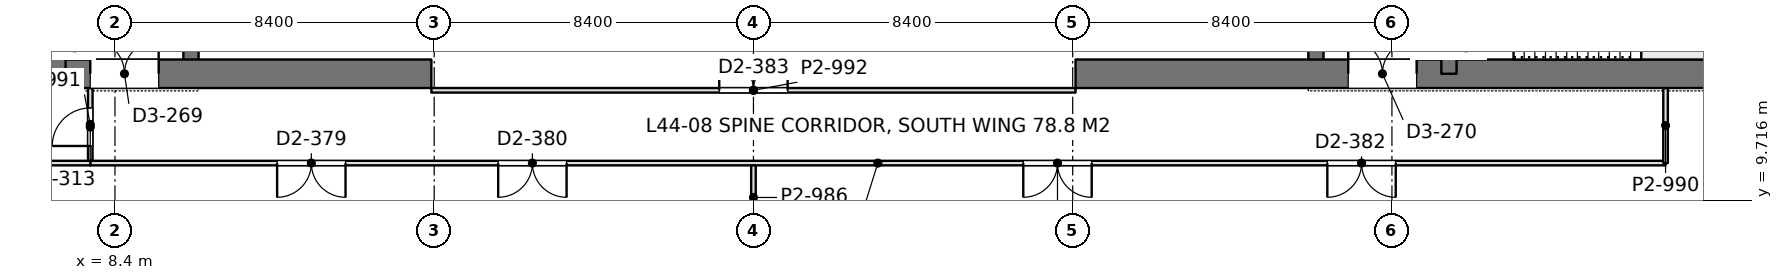
"""IFC4 building model, lengths in metres.
Left out: names, types, materials, properties, quantities, classifications, styles, units other than length and angle.
Written with IfcOpenShell. Run it as: python <this file> out.ifc"""

import sys

from ifc_helpers import new_model, si_unit, direction, frame, frame_2d, origin, place, context, subcontext, project, spatial, rectangle, extrude, element, fill, save


model = new_model("IFC4")
c1 = context("Model", 3, precision=1e-05, world=origin(), true_north=direction((0.0, 1.0)))
c2 = subcontext(c1, "Body", "Model", "MODEL_VIEW")
j1 = project(units=[si_unit("LENGTHUNIT", "METRE"), si_unit("PLANEANGLEUNIT", "RADIAN")], contexts=[c1])
p1 = place(None, origin())
s1 = spatial("IfcSite", under=j1, at=p1, CompositionType="ELEMENT")
p2 = place(p1, origin())
s2 = spatial("IfcBuilding", under=s1, at=p2, CompositionType="ELEMENT")
p3 = place(p2, frame((0.0, 0.0, 194.4)))
s3 = spatial("IfcBuildingStorey", under=s2, at=p3, CompositionType="ELEMENT", Elevation=194.4)
p4 = place(p3, frame((-1.125, 13.05, 0.0), z_axis=(0.0, 0.0, 1.0), x_axis=(1.0, 0.0, 0.0)))
e1 = element("IfcWall", 1, at=p4, inside=s3, PredefinedType="SHEAR", context=c2, shape_type="SweptSolid", body=[
    extrude(rectangle(XDim=17.85, YDim=0.75, at=frame_2d((8.925, 0.0))), origin(), (0.0, 0.0, 1.0), 4.2),
])
p5 = place(p4, frame((8.875, 0.0, 0.0)))
e2 = element("IfcOpeningElement", 2, at=p5, cuts=e1, PredefinedType="OPENING", context=c2, shape_type="SweptSolid", body=[
    extrude(rectangle(XDim=1.8, YDim=2.4, at=frame_2d((0.9, 1.2))), frame((0.0, 0.385, 0.0), z_axis=(0.0, -1.0, 0.0), x_axis=(1.0, 0.0, 0.0)), (0.0, 0.0, 1.0), 0.77),
])
p6 = place(p3, frame((6.9, 13.05, 0.0), z_axis=(0.0, 0.0, 1.0), x_axis=(0.0, 1.0, 0.0)))
e3 = element("IfcWall", 3, at=p6, inside=s3, PredefinedType="SHEAR", context=c2, shape_type="SweptSolid", body=[
    extrude(rectangle(XDim=24.3, YDim=0.4, at=frame_2d((12.15, 0.0))), origin(), (0.0, 0.0, 1.0), 4.2),
])
p7 = place(p6, frame((1.3, 0.0, 0.0)))
e4 = element("IfcOpeningElement", 4, at=p7, cuts=e3, PredefinedType="OPENING", context=c2, shape_type="SweptSolid", body=[
    extrude(rectangle(XDim=1.0, YDim=2.2, at=frame_2d((0.5, 1.1))), frame((0.0, 0.21, 0.0), z_axis=(0.0, -1.0, 0.0), x_axis=(1.0, 0.0, 0.0)), (0.0, 0.0, 1.0), 0.42),
])
p8 = place(p6, frame((22.0, 0.0, 0.0)))
e5 = element("IfcOpeningElement", 5, at=p8, cuts=e3, PredefinedType="OPENING", context=c2, shape_type="SweptSolid", body=[
    extrude(rectangle(XDim=1.0, YDim=2.2, at=frame_2d((0.5, 1.1))), frame((0.0, 0.21, 0.0), z_axis=(0.0, -1.0, 0.0), x_axis=(1.0, 0.0, 0.0)), (0.0, 0.0, 1.0), 0.42),
])
p9 = place(p6, frame((5.55, 0.0, 0.0)))
e6 = element("IfcOpeningElement", 6, at=p9, cuts=e3, PredefinedType="OPENING", context=c2, shape_type="SweptSolid", body=[
    extrude(rectangle(XDim=1.0, YDim=2.2, at=frame_2d((0.5, 1.1))), frame((0.0, 0.21, 0.0), z_axis=(0.0, -1.0, 0.0), x_axis=(1.0, 0.0, 0.0)), (0.0, 0.0, 1.0), 0.42),
])
p10 = place(p6, frame((9.55, 0.0, 0.0)))
e7 = element("IfcOpeningElement", 7, at=p10, cuts=e3, PredefinedType="OPENING", context=c2, shape_type="SweptSolid", body=[
    extrude(rectangle(XDim=1.0, YDim=2.2, at=frame_2d((0.5, 1.1))), frame((0.0, 0.21, 0.0), z_axis=(0.0, -1.0, 0.0), x_axis=(1.0, 0.0, 0.0)), (0.0, 0.0, 1.0), 0.42),
])
p11 = place(p6, frame((12.8, 0.0, 0.0)))
e8 = element("IfcOpeningElement", 8, at=p11, cuts=e3, PredefinedType="OPENING", context=c2, shape_type="SweptSolid", body=[
    extrude(rectangle(XDim=1.1, YDim=2.2, at=frame_2d((0.55, 1.1))), frame((0.0, 0.21, 0.0), z_axis=(0.0, -1.0, 0.0), x_axis=(1.0, 0.0, 0.0)), (0.0, 0.0, 1.0), 0.42),
])
p12 = place(p6, frame((15.538, 0.0, 0.0)))
e9 = element("IfcOpeningElement", 9, at=p12, cuts=e3, PredefinedType="OPENING", context=c2, shape_type="SweptSolid", body=[
    extrude(rectangle(XDim=1.1, YDim=2.2, at=frame_2d((0.55, 1.1))), frame((0.0, 0.21, 0.0), z_axis=(0.0, -1.0, 0.0), x_axis=(1.0, 0.0, 0.0)), (0.0, 0.0, 1.0), 0.42),
])
p13 = place(p6, frame((18.262, 0.0, 0.0)))
e10 = element("IfcOpeningElement", 10, at=p13, cuts=e3, PredefinedType="OPENING", context=c2, shape_type="SweptSolid", body=[
    extrude(rectangle(XDim=1.1, YDim=2.2, at=frame_2d((0.55, 1.1))), frame((0.0, 0.21, 0.0), z_axis=(0.0, -1.0, 0.0), x_axis=(1.0, 0.0, 0.0)), (0.0, 0.0, 1.0), 0.42),
])
p14 = place(p3, frame((10.4, 13.05, 0.0), z_axis=(0.0, 0.0, 1.0), x_axis=(0.0, 1.0, 0.0)))
e11 = element("IfcWall", 11, at=p14, inside=s3, PredefinedType="SHEAR", context=c2, shape_type="SweptSolid", body=[
    extrude(rectangle(XDim=24.3, YDim=0.4, at=frame_2d((12.15, 0.0))), origin(), (0.0, 0.0, 1.0), 4.2),
])
p15 = place(p14, frame((15.75, 0.0, 0.0)))
e12 = element("IfcOpeningElement", 12, at=p15, cuts=e11, PredefinedType="OPENING", context=c2, shape_type="SweptSolid", body=[
    extrude(rectangle(XDim=1.1, YDim=2.2, at=frame_2d((0.55, 1.1))), frame((0.0, 0.21, 0.0), z_axis=(0.0, -1.0, 0.0), x_axis=(1.0, 0.0, 0.0)), (0.0, 0.0, 1.0), 0.42),
])
p16 = place(p14, frame((18.6, 0.0, 0.0)))
e13 = element("IfcOpeningElement", 13, at=p16, cuts=e11, PredefinedType="OPENING", context=c2, shape_type="SweptSolid", body=[
    extrude(rectangle(XDim=1.1, YDim=2.2, at=frame_2d((0.55, 1.1))), frame((0.0, 0.21, 0.0), z_axis=(0.0, -1.0, 0.0), x_axis=(1.0, 0.0, 0.0)), (0.0, 0.0, 1.0), 0.42),
])
p17 = place(p14, frame((21.45, 0.0, 0.0)))
e14 = element("IfcOpeningElement", 14, at=p17, cuts=e11, PredefinedType="OPENING", context=c2, shape_type="SweptSolid", body=[
    extrude(rectangle(XDim=1.1, YDim=2.2, at=frame_2d((0.55, 1.1))), frame((0.0, 0.21, 0.0), z_axis=(0.0, -1.0, 0.0), x_axis=(1.0, 0.0, 0.0)), (0.0, 0.0, 1.0), 0.42),
])
p18 = place(p14, frame((8.65, 0.0, 0.0)))
e15 = element("IfcOpeningElement", 15, at=p18, cuts=e11, PredefinedType="OPENING", context=c2, shape_type="SweptSolid", body=[
    extrude(rectangle(XDim=1.8, YDim=2.4, at=frame_2d((0.9, 1.2))), frame((0.0, 0.21, 0.0), z_axis=(0.0, -1.0, 0.0), x_axis=(1.0, 0.0, 0.0)), (0.0, 0.0, 1.0), 0.42),
])
p19 = place(p3, frame((33.675, 13.05, 0.0), z_axis=(0.0, 0.0, 1.0), x_axis=(1.0, 0.0, 0.0)))
e16 = element("IfcWall", 16, at=p19, inside=s3, PredefinedType="SHEAR", context=c2, shape_type="SweptSolid", body=[
    extrude(rectangle(XDim=17.85, YDim=0.75, at=frame_2d((8.925, 0.0))), origin(), (0.0, 0.0, 1.0), 4.2),
])
p20 = place(p19, frame((7.175, 0.0, 0.0)))
e17 = element("IfcOpeningElement", 17, at=p20, cuts=e16, PredefinedType="OPENING", context=c2, shape_type="SweptSolid", body=[
    extrude(rectangle(XDim=1.8, YDim=2.4, at=frame_2d((0.9, 1.2))), frame((0.0, 0.385, 0.0), z_axis=(0.0, -1.0, 0.0), x_axis=(1.0, 0.0, 0.0)), (0.0, 0.0, 1.0), 0.77),
])
p21 = place(p3, frame((43.5, 13.05, 0.0), z_axis=(0.0, 0.0, 1.0), x_axis=(0.0, 1.0, 0.0)))
e18 = element("IfcWall", 18, at=p21, inside=s3, PredefinedType="SHEAR", context=c2, shape_type="SweptSolid", body=[
    extrude(rectangle(XDim=24.3, YDim=0.4, at=frame_2d((12.15, 0.0))), origin(), (0.0, 0.0, 1.0), 4.2),
])
p22 = place(p21, frame((1.3, 0.0, 0.0)))
e19 = element("IfcOpeningElement", 19, at=p22, cuts=e18, PredefinedType="OPENING", context=c2, shape_type="SweptSolid", body=[
    extrude(rectangle(XDim=1.0, YDim=2.2, at=frame_2d((0.5, 1.1))), frame((0.0, 0.21, 0.0), z_axis=(0.0, -1.0, 0.0), x_axis=(1.0, 0.0, 0.0)), (0.0, 0.0, 1.0), 0.42),
])
p23 = place(p21, frame((22.0, 0.0, 0.0)))
e20 = element("IfcOpeningElement", 20, at=p23, cuts=e18, PredefinedType="OPENING", context=c2, shape_type="SweptSolid", body=[
    extrude(rectangle(XDim=1.0, YDim=2.2, at=frame_2d((0.5, 1.1))), frame((0.0, 0.21, 0.0), z_axis=(0.0, -1.0, 0.0), x_axis=(1.0, 0.0, 0.0)), (0.0, 0.0, 1.0), 0.42),
])
p24 = place(p21, frame((5.55, 0.0, 0.0)))
e21 = element("IfcOpeningElement", 21, at=p24, cuts=e18, PredefinedType="OPENING", context=c2, shape_type="SweptSolid", body=[
    extrude(rectangle(XDim=1.0, YDim=2.2, at=frame_2d((0.5, 1.1))), frame((0.0, 0.21, 0.0), z_axis=(0.0, -1.0, 0.0), x_axis=(1.0, 0.0, 0.0)), (0.0, 0.0, 1.0), 0.42),
])
p25 = place(p21, frame((9.55, 0.0, 0.0)))
e22 = element("IfcOpeningElement", 22, at=p25, cuts=e18, PredefinedType="OPENING", context=c2, shape_type="SweptSolid", body=[
    extrude(rectangle(XDim=1.0, YDim=2.2, at=frame_2d((0.5, 1.1))), frame((0.0, 0.21, 0.0), z_axis=(0.0, -1.0, 0.0), x_axis=(1.0, 0.0, 0.0)), (0.0, 0.0, 1.0), 0.42),
])
p26 = place(p21, frame((12.8, 0.0, 0.0)))
e23 = element("IfcOpeningElement", 23, at=p26, cuts=e18, PredefinedType="OPENING", context=c2, shape_type="SweptSolid", body=[
    extrude(rectangle(XDim=1.1, YDim=2.2, at=frame_2d((0.55, 1.1))), frame((0.0, 0.21, 0.0), z_axis=(0.0, -1.0, 0.0), x_axis=(1.0, 0.0, 0.0)), (0.0, 0.0, 1.0), 0.42),
])
p27 = place(p21, frame((15.538, 0.0, 0.0)))
e24 = element("IfcOpeningElement", 24, at=p27, cuts=e18, PredefinedType="OPENING", context=c2, shape_type="SweptSolid", body=[
    extrude(rectangle(XDim=1.1, YDim=2.2, at=frame_2d((0.55, 1.1))), frame((0.0, 0.21, 0.0), z_axis=(0.0, -1.0, 0.0), x_axis=(1.0, 0.0, 0.0)), (0.0, 0.0, 1.0), 0.42),
])
p28 = place(p21, frame((18.262, 0.0, 0.0)))
e25 = element("IfcOpeningElement", 25, at=p28, cuts=e18, PredefinedType="OPENING", context=c2, shape_type="SweptSolid", body=[
    extrude(rectangle(XDim=1.1, YDim=2.2, at=frame_2d((0.55, 1.1))), frame((0.0, 0.21, 0.0), z_axis=(0.0, -1.0, 0.0), x_axis=(1.0, 0.0, 0.0)), (0.0, 0.0, 1.0), 0.42),
])
p29 = place(p3, frame((40.0, 13.05, 0.0), z_axis=(0.0, 0.0, 1.0), x_axis=(0.0, 1.0, 0.0)))
e26 = element("IfcWall", 26, at=p29, inside=s3, PredefinedType="SHEAR", context=c2, shape_type="SweptSolid", body=[
    extrude(rectangle(XDim=24.3, YDim=0.4, at=frame_2d((12.15, 0.0))), origin(), (0.0, 0.0, 1.0), 4.2),
])
p30 = place(p29, frame((15.75, 0.0, 0.0)))
e27 = element("IfcOpeningElement", 27, at=p30, cuts=e26, PredefinedType="OPENING", context=c2, shape_type="SweptSolid", body=[
    extrude(rectangle(XDim=1.1, YDim=2.2, at=frame_2d((0.55, 1.1))), frame((0.0, 0.21, 0.0), z_axis=(0.0, -1.0, 0.0), x_axis=(1.0, 0.0, 0.0)), (0.0, 0.0, 1.0), 0.42),
])
p31 = place(p29, frame((18.6, 0.0, 0.0)))
e28 = element("IfcOpeningElement", 28, at=p31, cuts=e26, PredefinedType="OPENING", context=c2, shape_type="SweptSolid", body=[
    extrude(rectangle(XDim=1.1, YDim=2.2, at=frame_2d((0.55, 1.1))), frame((0.0, 0.21, 0.0), z_axis=(0.0, -1.0, 0.0), x_axis=(1.0, 0.0, 0.0)), (0.0, 0.0, 1.0), 0.42),
])
p32 = place(p29, frame((21.45, 0.0, 0.0)))
e29 = element("IfcOpeningElement", 29, at=p32, cuts=e26, PredefinedType="OPENING", context=c2, shape_type="SweptSolid", body=[
    extrude(rectangle(XDim=1.1, YDim=2.2, at=frame_2d((0.55, 1.1))), frame((0.0, 0.21, 0.0), z_axis=(0.0, -1.0, 0.0), x_axis=(1.0, 0.0, 0.0)), (0.0, 0.0, 1.0), 0.42),
])
p33 = place(p29, frame((8.65, 0.0, 0.0)))
e30 = element("IfcOpeningElement", 30, at=p33, cuts=e26, PredefinedType="OPENING", context=c2, shape_type="SweptSolid", body=[
    extrude(rectangle(XDim=1.8, YDim=2.4, at=frame_2d((0.9, 1.2))), frame((0.0, 0.21, 0.0), z_axis=(0.0, -1.0, 0.0), x_axis=(1.0, 0.0, 0.0)), (0.0, 0.0, 1.0), 0.42),
])
p34 = place(p3, frame((25.2, 8.949, 0.0), z_axis=(0.0, 0.0, 1.0), x_axis=(0.0, 1.0, 0.0)))
e31 = element("IfcWall", 31, at=p34, inside=s3, PredefinedType="PARTITIONING", context=c2, shape_type="SweptSolid", body=[
    extrude(rectangle(XDim=1.693, YDim=0.12, at=frame_2d((0.847, 0.0))), origin(), (0.0, 0.0, 1.0), 3.55),
])
p35 = place(p3, frame((7.748, 10.7, 0.0), z_axis=(0.0, 0.0, 1.0), x_axis=(1.0, 0.0, 0.0)))
e32 = element("IfcWall", 32, at=p35, inside=s3, PredefinedType="PARTITIONING", context=c2, shape_type="SweptSolid", body=[
    extrude(rectangle(XDim=41.452, YDim=0.12, at=frame_2d((20.726, 0.0))), origin(), (0.0, 0.0, 1.0), 3.55),
])
p36 = place(p35, frame((4.919, 0.0, 0.0)))
e33 = element("IfcOpeningElement", 33, at=p36, cuts=e32, PredefinedType="OPENING", context=c2, shape_type="SweptSolid", body=[
    extrude(rectangle(XDim=1.8, YDim=2.2, at=frame_2d((0.9, 1.1))), frame((0.0, 0.07, 0.0), z_axis=(0.0, -1.0, 0.0), x_axis=(1.0, 0.0, 0.0)), (0.0, 0.0, 1.0), 0.14),
])
p37 = place(p35, frame((10.735, 0.0, 0.0)))
e34 = element("IfcOpeningElement", 34, at=p37, cuts=e32, PredefinedType="OPENING", context=c2, shape_type="SweptSolid", body=[
    extrude(rectangle(XDim=1.8, YDim=2.2, at=frame_2d((0.9, 1.1))), frame((0.0, 0.07, 0.0), z_axis=(0.0, -1.0, 0.0), x_axis=(1.0, 0.0, 0.0)), (0.0, 0.0, 1.0), 0.14),
])
p38 = place(p35, frame((24.552, 0.0, 0.0)))
e35 = element("IfcOpeningElement", 35, at=p38, cuts=e32, PredefinedType="OPENING", context=c2, shape_type="SweptSolid", body=[
    extrude(rectangle(XDim=1.8, YDim=2.2, at=frame_2d((0.9, 1.1))), frame((0.0, 0.07, 0.0), z_axis=(0.0, -1.0, 0.0), x_axis=(1.0, 0.0, 0.0)), (0.0, 0.0, 1.0), 0.14),
])
p39 = place(p35, frame((32.552, 0.0, 0.0)))
e36 = element("IfcOpeningElement", 36, at=p39, cuts=e32, PredefinedType="OPENING", context=c2, shape_type="SweptSolid", body=[
    extrude(rectangle(XDim=1.8, YDim=2.2, at=frame_2d((0.9, 1.1))), frame((0.0, 0.07, 0.0), z_axis=(0.0, -1.0, 0.0), x_axis=(1.0, 0.0, 0.0)), (0.0, 0.0, 1.0), 0.14),
])
p40 = place(p3, frame((7.75, 10.758, 0.0), z_axis=(0.0, 0.0, 1.0), x_axis=(0.0, 1.0, 0.0)))
e37 = element("IfcWall", 37, at=p40, inside=s3, PredefinedType="PARTITIONING", context=c2, shape_type="SweptSolid", body=[
    extrude(rectangle(XDim=1.918, YDim=0.12, at=frame_2d((0.959, 0.0))), origin(), (0.0, 0.0, 1.0), 4.05),
])
p41 = place(p40, frame((0.392, 0.0, 0.0)))
e38 = element("IfcOpeningElement", 38, at=p41, cuts=e37, PredefinedType="OPENING", context=c2, shape_type="SweptSolid", body=[
    extrude(rectangle(XDim=1.0, YDim=2.4, at=frame_2d((0.5, 1.2))), frame((0.0, 0.07, 0.0), z_axis=(0.0, -1.0, 0.0), x_axis=(1.0, 0.0, 0.0)), (0.0, 0.0, 1.0), 0.14),
])
p42 = place(p3, frame((49.2, 10.7, 0.0), z_axis=(0.0, 0.0, 1.0), x_axis=(0.0, 1.0, 0.0)))
e39 = element("IfcWall", 39, at=p42, inside=s3, PredefinedType="PARTITIONING", context=c2, shape_type="SweptSolid", body=[
    extrude(rectangle(XDim=1.976, YDim=0.12, at=frame_2d((0.988, 0.0))), origin(), (0.0, 0.0, 1.0), 4.05),
])
p43 = place(p3, frame((1.2, 10.7, 0.0), z_axis=(0.0, 0.0, 1.0), x_axis=(1.0, 0.0, 0.0)))
e40 = element("IfcWall", 40, at=p43, inside=s3, PredefinedType="PARTITIONING", context=c2, shape_type="SweptSolid", body=[
    extrude(rectangle(XDim=6.552, YDim=0.12, at=frame_2d((3.276, 0.0))), origin(), (0.0, 0.0, 1.0), 4.05),
])
p44 = place(p3, frame((16.725, 12.615, 0.0), z_axis=(0.0, 0.0, 1.0), x_axis=(1.0, 0.0, 0.0)))
e41 = element("IfcWall", 41, at=p44, inside=s3, PredefinedType="PARTITIONING", context=c2, shape_type="SweptSolid", body=[
    extrude(rectangle(XDim=16.95, YDim=0.12, at=frame_2d((8.475, 0.0))), origin(), (0.0, 0.0, 1.0), 3.55),
])
p45 = place(p44, frame((7.575, 0.0, 0.0)))
e42 = element("IfcOpeningElement", 42, at=p45, cuts=e41, PredefinedType="OPENING", context=c2, shape_type="SweptSolid", body=[
    extrude(rectangle(XDim=1.8, YDim=2.2, at=frame_2d((0.9, 1.1))), frame((0.0, 0.07, 0.0), z_axis=(0.0, -1.0, 0.0), x_axis=(1.0, 0.0, 0.0)), (0.0, 0.0, 1.0), 0.14),
])
p46 = place(p5, origin())
e43 = element("IfcDoor", 43, at=p46, inside=s3, OperationType="DOUBLE_DOOR_SINGLE_SWING", PredefinedType="DOOR", context=c2, shape_type="SweptSolid", body=[
    extrude(rectangle(XDim=1.8, YDim=2.4, at=frame_2d((0.9, 1.2))), frame((0.0, 0.025, 0.0), z_axis=(0.0, -1.0, 0.0), x_axis=(1.0, 0.0, 0.0)), (0.0, 0.0, 1.0), 0.05),
])
fill(e2, e43)
p47 = place(p20, origin())
e44 = element("IfcDoor", 44, at=p47, inside=s3, OperationType="DOUBLE_DOOR_SINGLE_SWING", PredefinedType="DOOR", context=c2, shape_type="SweptSolid", body=[
    extrude(rectangle(XDim=1.8, YDim=2.4, at=frame_2d((0.9, 1.2))), frame((0.0, 0.025, 0.0), z_axis=(0.0, -1.0, 0.0), x_axis=(1.0, 0.0, 0.0)), (0.0, 0.0, 1.0), 0.05),
])
fill(e17, e44)
p48 = place(p36, frame((1.8, 0.0, 0.0), z_axis=(0.0, 0.0, 1.0), x_axis=(-1.0, 0.0, 0.0)))
e45 = element("IfcDoor", 45, at=p48, inside=s3, OperationType="DOUBLE_DOOR_SINGLE_SWING", PredefinedType="DOOR", context=c2, shape_type="SweptSolid", body=[
    extrude(rectangle(XDim=1.8, YDim=2.2, at=frame_2d((0.9, 1.1))), frame((0.0, 0.025, 0.0), z_axis=(0.0, -1.0, 0.0), x_axis=(1.0, 0.0, 0.0)), (0.0, 0.0, 1.0), 0.05),
])
fill(e33, e45)
p49 = place(p37, frame((1.8, 0.0, 0.0), z_axis=(0.0, 0.0, 1.0), x_axis=(-1.0, 0.0, 0.0)))
e46 = element("IfcDoor", 46, at=p49, inside=s3, OperationType="DOUBLE_DOOR_SINGLE_SWING", PredefinedType="DOOR", context=c2, shape_type="SweptSolid", body=[
    extrude(rectangle(XDim=1.8, YDim=2.2, at=frame_2d((0.9, 1.1))), frame((0.0, 0.025, 0.0), z_axis=(0.0, -1.0, 0.0), x_axis=(1.0, 0.0, 0.0)), (0.0, 0.0, 1.0), 0.05),
])
fill(e34, e46)
p50 = place(p38, frame((1.8, 0.0, 0.0), z_axis=(0.0, 0.0, 1.0), x_axis=(-1.0, 0.0, 0.0)))
e47 = element("IfcDoor", 47, at=p50, inside=s3, OperationType="DOUBLE_DOOR_SINGLE_SWING", PredefinedType="DOOR", context=c2, shape_type="SweptSolid", body=[
    extrude(rectangle(XDim=1.8, YDim=2.2, at=frame_2d((0.9, 1.1))), frame((0.0, 0.025, 0.0), z_axis=(0.0, -1.0, 0.0), x_axis=(1.0, 0.0, 0.0)), (0.0, 0.0, 1.0), 0.05),
])
fill(e35, e47)
p51 = place(p39, frame((1.8, 0.0, 0.0), z_axis=(0.0, 0.0, 1.0), x_axis=(-1.0, 0.0, 0.0)))
e48 = element("IfcDoor", 48, at=p51, inside=s3, OperationType="DOUBLE_DOOR_SINGLE_SWING", PredefinedType="DOOR", context=c2, shape_type="SweptSolid", body=[
    extrude(rectangle(XDim=1.8, YDim=2.2, at=frame_2d((0.9, 1.1))), frame((0.0, 0.025, 0.0), z_axis=(0.0, -1.0, 0.0), x_axis=(1.0, 0.0, 0.0)), (0.0, 0.0, 1.0), 0.05),
])
fill(e36, e48)
p52 = place(p41, origin())
e49 = element("IfcDoor", 49, at=p52, inside=s3, OperationType="SINGLE_SWING_LEFT", PredefinedType="DOOR", context=c2, shape_type="SweptSolid", body=[
    extrude(rectangle(XDim=1.0, YDim=2.4, at=frame_2d((0.5, 1.2))), frame((0.0, 0.025, 0.0), z_axis=(0.0, -1.0, 0.0), x_axis=(1.0, 0.0, 0.0)), (0.0, 0.0, 1.0), 0.05),
])
fill(e38, e49)
p53 = place(p45, origin())
e50 = element("IfcDoor", 50, at=p53, inside=s3, OperationType="DOUBLE_DOOR_SINGLE_SWING", PredefinedType="DOOR", context=c2, shape_type="SweptSolid", body=[
    extrude(rectangle(XDim=1.8, YDim=2.2, at=frame_2d((0.9, 1.1))), frame((0.0, 0.025, 0.0), z_axis=(0.0, -1.0, 0.0), x_axis=(1.0, 0.0, 0.0)), (0.0, 0.0, 1.0), 0.05),
])
fill(e42, e50)
save(model, sys.argv[1])
